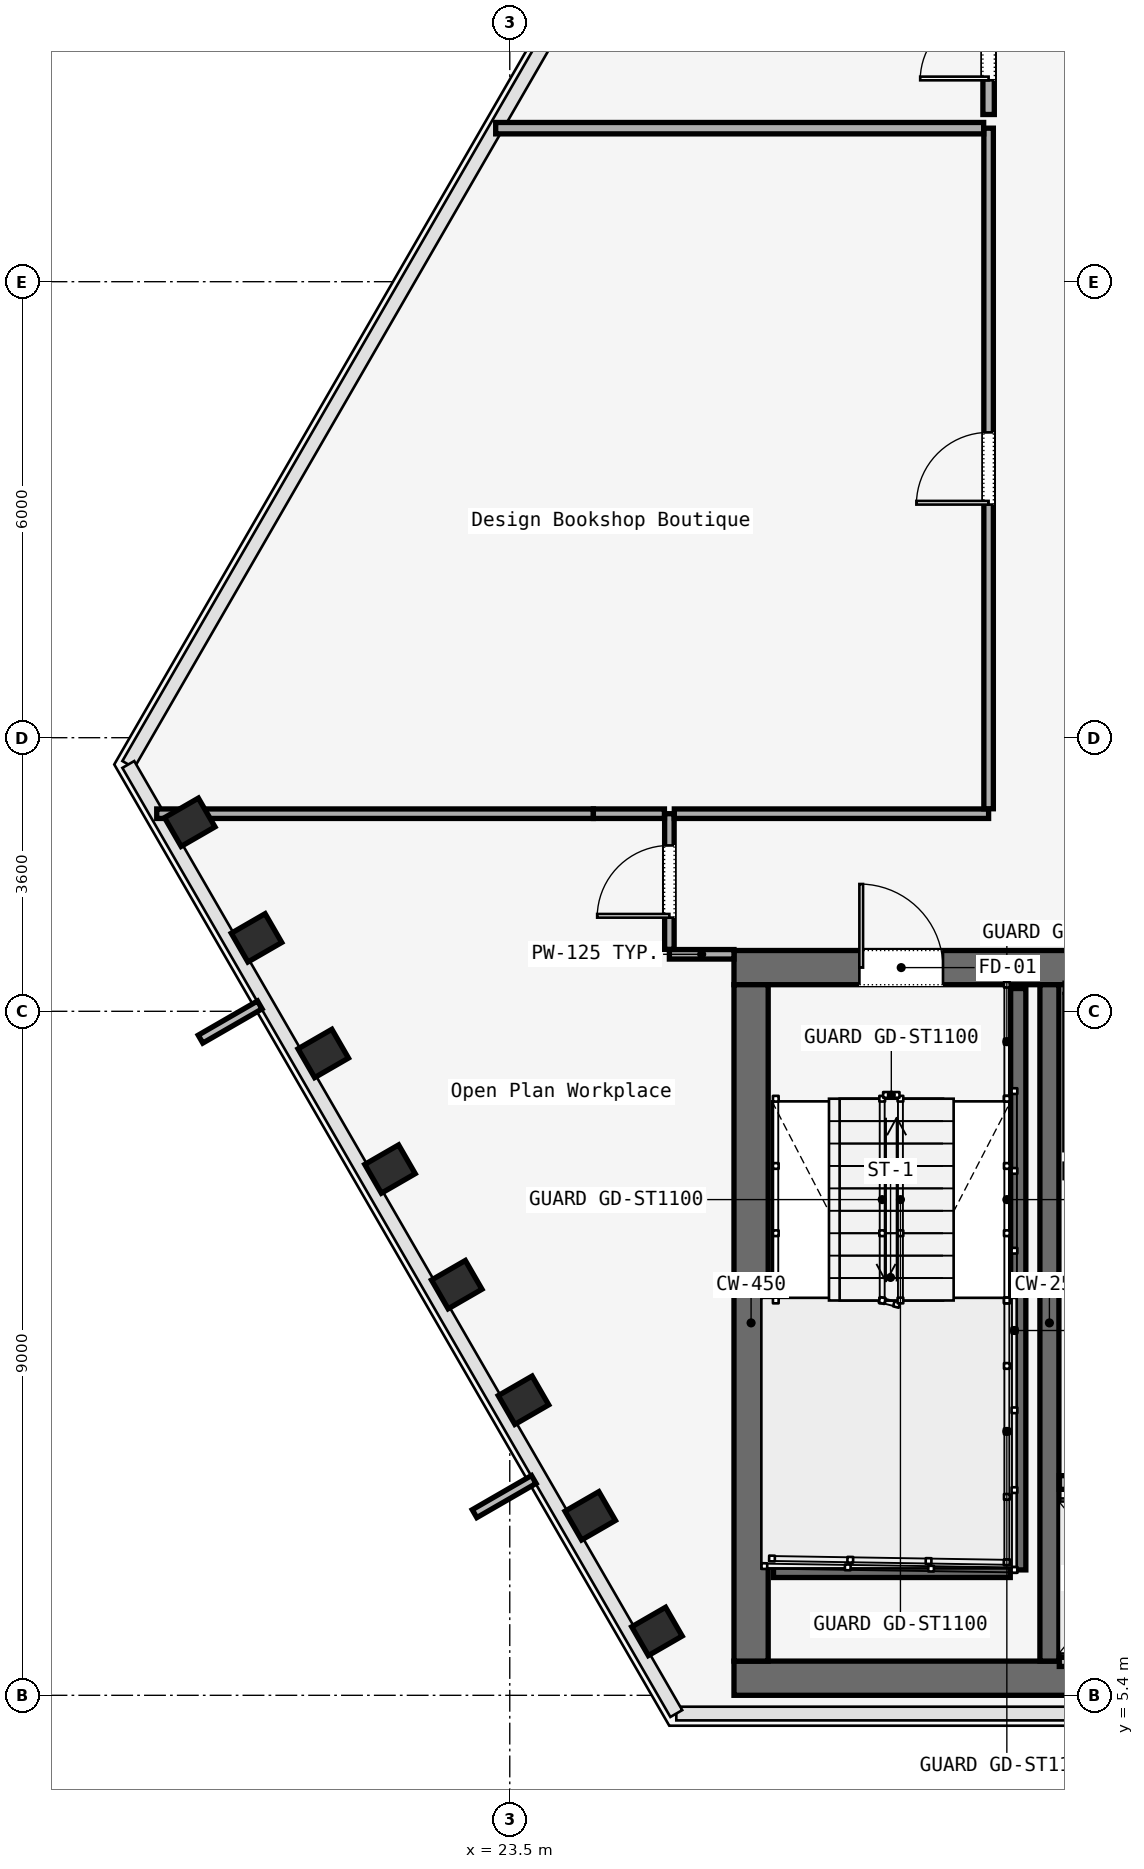
"""IFC4 building model, lengths in metres.
Left out: names, types, materials, properties, quantities, classifications, styles, units other than length and angle.
Written with IfcOpenShell. Run it as: python <this file> out.ifc"""

import sys

from ifc_helpers import new_model, si_unit, direction, frame, frame_2d, origin, origin_2d, place, context, subcontext, project, spatial, rectangle, i_section, extrude, element, fill, save


model = new_model("IFC4")
c1 = context("Model", 3, precision=1e-05, world=origin(), true_north=direction((0.0, 1.0)))
c2 = subcontext(c1, "Body", "Model", "MODEL_VIEW")
j1 = project(units=[si_unit("LENGTHUNIT", "METRE"), si_unit("PLANEANGLEUNIT", "RADIAN")], contexts=[c1])
p1 = place(None, origin())
s1 = spatial("IfcSite", under=j1, at=p1, CompositionType="ELEMENT")
p2 = place(p1, origin())
s2 = spatial("IfcBuilding", under=s1, at=p2, CompositionType="ELEMENT")
p3 = place(p2, frame((0.0, 0.0, 85.4)))
s3 = spatial("IfcBuildingStorey", under=s2, at=p3, CompositionType="ELEMENT", Elevation=85.4)
p4 = place(p3, frame((26.45, 14.975, 0.0), z_axis=(0.0, 0.0, 1.0), x_axis=(1.0, 0.0, 0.0)))
e1 = element("IfcWall", 1, at=p4, inside=s3, PredefinedType="SOLIDWALL", context=c2, shape_type="SweptSolid", body=[
    extrude(rectangle(XDim=31.1, YDim=0.45, at=frame_2d((15.55, 0.0))), origin(), (0.0, 0.0, 1.0), 3.58),
])
p5 = place(p4, frame((1.65, 0.0, 0.0)))
e2 = element("IfcOpeningElement", 2, at=p5, cuts=e1, PredefinedType="OPENING", context=c2, shape_type="SweptSolid", body=[
    extrude(rectangle(XDim=1.1, YDim=2.2, at=frame_2d((0.55, 1.1))), frame((0.0, 0.225, 0.0), z_axis=(0.0, -1.0, 0.0), x_axis=(1.0, 0.0, 0.0)), (0.0, 0.0, 1.0), 0.45),
])
p6 = place(p4, frame((13.65, 0.0, 0.0)))
e3 = element("IfcOpeningElement", 3, at=p6, cuts=e1, PredefinedType="OPENING", context=c2, shape_type="SweptSolid", body=[
    extrude(rectangle(XDim=1.1, YDim=2.2, at=frame_2d((0.55, 1.1))), frame((0.0, 0.225, 0.0), z_axis=(0.0, -1.0, 0.0), x_axis=(1.0, 0.0, 0.0)), (0.0, 0.0, 1.0), 0.45),
])
p7 = place(p4, frame((25.55, 0.0, 0.0)))
e4 = element("IfcOpeningElement", 4, at=p7, cuts=e1, PredefinedType="OPENING", context=c2, shape_type="SweptSolid", body=[
    extrude(rectangle(XDim=1.1, YDim=2.2, at=frame_2d((0.55, 1.1))), frame((0.0, 0.225, 0.0), z_axis=(0.0, -1.0, 0.0), x_axis=(1.0, 0.0, 0.0)), (0.0, 0.0, 1.0), 0.45),
])
p8 = place(p4, frame((10.7, 0.0, 0.0)))
e5 = element("IfcOpeningElement", 5, at=p8, cuts=e1, PredefinedType="OPENING", context=c2, shape_type="SweptSolid", body=[
    extrude(rectangle(XDim=1.4, YDim=2.2, at=frame_2d((0.7, 1.1))), frame((0.0, 0.225, 0.0), z_axis=(0.0, -1.0, 0.0), x_axis=(1.0, 0.0, 0.0)), (0.0, 0.0, 1.0), 0.45),
])
p9 = place(p4, frame((19.35, 0.0, 0.0)))
e6 = element("IfcOpeningElement", 6, at=p9, cuts=e1, PredefinedType="OPENING", context=c2, shape_type="SweptSolid", body=[
    extrude(rectangle(XDim=1.1, YDim=2.2, at=frame_2d((0.55, 1.1))), frame((0.0, 0.225, 0.0), z_axis=(0.0, -1.0, 0.0), x_axis=(1.0, 0.0, 0.0)), (0.0, 0.0, 1.0), 0.45),
])
p10 = place(p4, frame((21.4, 0.0, 0.0)))
e7 = element("IfcOpeningElement", 7, at=p10, cuts=e1, PredefinedType="OPENING", context=c2, shape_type="SweptSolid", body=[
    extrude(rectangle(XDim=0.9, YDim=2.1, at=frame_2d((0.45, 1.05))), frame((0.0, 0.225, 0.0), z_axis=(0.0, -1.0, 0.0), x_axis=(1.0, 0.0, 0.0)), (0.0, 0.0, 1.0), 0.45),
])
p11 = place(p4, frame((23.35, 0.0, 0.0)))
e8 = element("IfcOpeningElement", 8, at=p11, cuts=e1, PredefinedType="OPENING", context=c2, shape_type="SweptSolid", body=[
    extrude(rectangle(XDim=1.3, YDim=2.3, at=frame_2d((0.65, 1.15))), frame((0.0, 0.225, 0.0), z_axis=(0.0, -1.0, 0.0), x_axis=(1.0, 0.0, 0.0)), (0.0, 0.0, 1.0), 0.45),
])
p12 = place(p3, frame((26.45, 5.625, 0.0), z_axis=(0.0, 0.0, 1.0), x_axis=(1.0, 0.0, 0.0)))
e9 = element("IfcWall", 9, at=p12, inside=s3, PredefinedType="SOLIDWALL", context=c2, shape_type="SweptSolid", body=[
    extrude(rectangle(XDim=31.1, YDim=0.45, at=frame_2d((15.55, 0.0))), origin(), (0.0, 0.0, 1.0), 3.58),
])
p13 = place(p3, frame((26.675, 5.85, 0.0), z_axis=(0.0, 0.0, 1.0), x_axis=(0.0, 1.0, 0.0)))
e10 = element("IfcWall", 10, at=p13, inside=s3, PredefinedType="SOLIDWALL", context=c2, shape_type="SweptSolid", body=[
    extrude(rectangle(XDim=8.9, YDim=0.45, at=frame_2d((4.45, 0.0))), origin(), (0.0, 0.0, 1.0), 3.58),
])
p14 = place(p3, frame((30.6, 5.85, 0.0), z_axis=(0.0, 0.0, 1.0), x_axis=(0.0, 1.0, 0.0)))
e11 = element("IfcWall", 11, at=p14, inside=s3, PredefinedType="SOLIDWALL", context=c2, shape_type="SweptSolid", body=[
    extrude(rectangle(XDim=8.9, YDim=0.25, at=frame_2d((4.45, 0.0))), origin(), (0.0, 0.0, 1.0), 3.58),
])
for number, where, z_axis, x_axis in (
    (12, (19.29, 16.887, 0.0), (0.0, 0.0, 1.0), (-0.5, 0.866, 0.0)),
    (13, (20.168, 15.366, 0.0), (0.0, 0.0, 1.0), (-0.5, 0.866, 0.0)),
    (14, (21.046, 13.845, 0.0), (0.0, 0.0, 1.0), (-0.5, 0.866, 0.0)),
    (15, (21.924, 12.324, 0.0), (0.0, 0.0, 1.0), (-0.5, 0.866, 0.0)),
    (16, (22.802, 10.803, 0.0), (0.0, 0.0, 1.0), (-0.5, 0.866, 0.0)),
    (17, (23.68, 9.282, 0.0), (0.0, 0.0, 1.0), (-0.5, 0.866, 0.0)),
    (18, (24.559, 7.761, 0.0), (0.0, 0.0, 1.0), (-0.5, 0.866, 0.0)),
    (19, (25.437, 6.24, 0.0), (0.0, 0.0, 1.0), (-0.5, 0.866, 0.0)),
):
    element("IfcColumn", number, at=place(p3, frame(where, z_axis=z_axis, x_axis=x_axis)), inside=s3, PredefinedType="COLUMN", context=c2, shape_type="SweptSolid", body=[
        extrude(i_section(OverallWidth=0.437, OverallDepth=0.514, WebThickness=0.061, FlangeThickness=0.077, FilletRadius=0.015, at=origin_2d()), origin(), (0.0, 0.0, 1.0), 3.58),
    ])
p15 = place(p3, frame((30.19, 14.7, 0.0), z_axis=(0.0, 0.0, 1.0), x_axis=(0.0, -1.0, 0.0)))
e20 = element("IfcWall", 20, at=p15, inside=s3, PredefinedType="SOLIDWALL", context=c2, shape_type="SweptSolid", body=[
    extrude(rectangle(XDim=7.65, YDim=0.2, at=frame_2d((3.825, 0.0))), origin(), (0.0, 0.0, 1.0), 3.8),
])
p16 = place(p3, frame((26.97, 7.05, 0.0), z_axis=(0.0, 0.0, 1.0), x_axis=(1.0, 0.0, 0.0)))
e21 = element("IfcWall", 21, at=p16, inside=s3, PredefinedType="SOLIDWALL", context=c2, shape_type="SweptSolid", body=[
    extrude(rectangle(XDim=3.115, YDim=0.2, at=frame_2d((1.558, 0.0))), origin(), (0.0, 0.0, 1.0), 3.8),
])
p17 = place(p3, frame((30.73, 8.2, 0.0), z_axis=(0.0, 0.0, 1.0), x_axis=(1.0, 0.0, 0.0)))
e22 = element("IfcWall", 22, at=p17, inside=s3, PredefinedType="SOLIDWALL", context=c2, shape_type="SweptSolid", body=[
    extrude(rectangle(XDim=1.665, YDim=0.18, at=frame_2d((0.833, 0.0))), origin(), (0.0, 0.0, 1.0), 2.95),
])
p18 = place(p17, frame((0.282, 0.0, 0.0)))
e23 = element("IfcOpeningElement", 23, at=p18, cuts=e22, PredefinedType="OPENING", context=c2, shape_type="SweptSolid", body=[
    extrude(rectangle(XDim=1.1, YDim=2.2, at=frame_2d((0.55, 1.1))), frame((0.0, 0.09, 0.0), z_axis=(0.0, -1.0, 0.0), x_axis=(1.0, 0.0, 0.0)), (0.0, 0.0, 1.0), 0.18),
])
p19 = place(p3, frame((30.73, 5.84, 0.0), z_axis=(0.0, 0.0, 1.0), x_axis=(1.0, 0.0, 0.0)))
e24 = element("IfcWall", 24, at=p19, inside=s3, PredefinedType="SOLIDWALL", context=c2, shape_type="SweptSolid", body=[
    extrude(rectangle(XDim=1.665, YDim=0.12, at=frame_2d((0.833, 0.0))), origin(), (0.0, 0.0, 1.0), 2.95),
])
p20 = place(p3, frame((26.45, 15.15, 0.0), z_axis=(0.0, 0.0, 1.0), x_axis=(-1.0, 0.0, 0.0)))
e25 = element("IfcWall", 25, at=p20, inside=s3, PredefinedType="PARTITIONING", context=c2, shape_type="SweptSolid", body=[
    extrude(rectangle(XDim=0.85, YDim=0.125, at=frame_2d((0.425, 0.0))), origin(), (0.0, 0.0, 1.0), 2.95),
])
p21 = place(p3, frame((25.6, 15.215, 0.0), z_axis=(0.0, 0.0, 1.0), x_axis=(0.0, 1.0, 0.0)))
e26 = element("IfcWall", 26, at=p21, inside=s3, PredefinedType="PARTITIONING", context=c2, shape_type="SweptSolid", body=[
    extrude(rectangle(XDim=1.785, YDim=0.125, at=frame_2d((0.893, 0.0))), origin(), (0.0, 0.0, 1.0), 2.95),
])
p22 = place(p21, frame((0.417, 0.0, 0.0)))
e27 = element("IfcOpeningElement", 27, at=p22, cuts=e26, PredefinedType="OPENING", context=c2, shape_type="SweptSolid", body=[
    extrude(rectangle(XDim=0.95, YDim=2.2, at=frame_2d((0.475, 1.1))), frame((0.0, 0.062, 0.0), z_axis=(0.0, -1.0, 0.0), x_axis=(1.0, 0.0, 0.0)), (0.0, 0.0, 1.0), 0.125),
])
p23 = place(p3, frame((25.665, 17.0, 0.0), z_axis=(0.0, 0.0, 1.0), x_axis=(1.0, 0.0, 0.0)))
e28 = element("IfcWall", 28, at=p23, inside=s3, PredefinedType="PARTITIONING", context=c2, shape_type="SweptSolid", body=[
    extrude(rectangle(XDim=4.135, YDim=0.125, at=frame_2d((2.067, 0.0))), origin(), (0.0, 0.0, 1.0), 2.95),
])
p24 = place(p3, frame((29.8, 17.065, 0.0), z_axis=(0.0, 0.0, 1.0), x_axis=(0.0, 1.0, 0.0)))
e29 = element("IfcWall", 29, at=p24, inside=s3, PredefinedType="PARTITIONING", context=c2, shape_type="SweptSolid", body=[
    extrude(rectangle(XDim=8.955, YDim=0.125, at=frame_2d((4.478, 0.0))), origin(), (0.0, 0.0, 1.0), 2.95),
])
p25 = place(p24, frame((4.002, 0.0, 0.0)))
e30 = element("IfcOpeningElement", 30, at=p25, cuts=e29, PredefinedType="OPENING", context=c2, shape_type="SweptSolid", body=[
    extrude(rectangle(XDim=0.95, YDim=2.2, at=frame_2d((0.475, 1.1))), frame((0.0, 0.062, 0.0), z_axis=(0.0, -1.0, 0.0), x_axis=(1.0, 0.0, 0.0)), (0.0, 0.0, 1.0), 0.125),
])
p26 = place(p3, frame((29.8, 26.2, 0.0), z_axis=(0.0, 0.0, 1.0), x_axis=(0.0, 1.0, 0.0)))
e31 = element("IfcWall", 31, at=p26, inside=s3, PredefinedType="PARTITIONING", context=c2, shape_type="SweptSolid", body=[
    extrude(rectangle(XDim=1.8, YDim=0.15, at=frame_2d((0.9, 0.0))), origin(), (0.0, 0.0, 1.0), 2.95),
])
p27 = place(p26, frame((0.45, 0.0, 0.0)))
e32 = element("IfcOpeningElement", 32, at=p27, cuts=e31, PredefinedType="OPENING", context=c2, shape_type="SweptSolid", body=[
    extrude(rectangle(XDim=0.9, YDim=2.15, at=frame_2d((0.45, 1.075))), frame((0.0, 0.075, 0.0), z_axis=(0.0, -1.0, 0.0), x_axis=(1.0, 0.0, 0.0)), (0.0, 0.0, 1.0), 0.15),
])
p28 = place(p3, frame((18.855, 17.0, 0.0), z_axis=(0.0, 0.0, 1.0), x_axis=(1.0, 0.0, 0.0)))
e33 = element("IfcWall", 33, at=p28, inside=s3, PredefinedType="PARTITIONING", context=c2, shape_type="SweptSolid", body=[
    extrude(rectangle(XDim=5.745, YDim=0.125, at=frame_2d((2.873, 0.0))), origin(), (0.0, 0.0, 1.0), 2.95),
])
p29 = place(p3, frame((24.6, 17.0, 0.0), z_axis=(0.0, 0.0, 1.0), x_axis=(1.0, 0.0, 0.0)))
e34 = element("IfcWall", 34, at=p29, inside=s3, PredefinedType="PARTITIONING", context=c2, shape_type="SweptSolid", body=[
    extrude(rectangle(XDim=0.935, YDim=0.125, at=frame_2d((0.467, 0.0))), origin(), (0.0, 0.0, 1.0), 2.95),
])
p30 = place(p3, frame((23.315, 26.02, 0.0), z_axis=(0.0, 0.0, 1.0), x_axis=(1.0, 0.0, 0.0)))
e35 = element("IfcWall", 35, at=p30, inside=s3, PredefinedType="PARTITIONING", context=c2, shape_type="SweptSolid", body=[
    extrude(rectangle(XDim=6.42, YDim=0.15, at=frame_2d((3.21, 0.0))), origin(), (0.0, 0.0, 1.0), 2.95),
])
p31 = place(p5, origin())
e36 = element("IfcDoor", 36, at=p31, inside=s3, OperationType="SINGLE_SWING_RIGHT", PredefinedType="DOOR", context=c2, shape_type="SweptSolid", body=[
    extrude(rectangle(XDim=1.1, YDim=2.2, at=frame_2d((0.55, 1.1))), frame((0.0, 0.025, 0.0), z_axis=(0.0, -1.0, 0.0), x_axis=(1.0, 0.0, 0.0)), (0.0, 0.0, 1.0), 0.05),
])
fill(e2, e36)
p32 = place(p22, origin())
e37 = element("IfcDoor", 37, at=p32, inside=s3, OperationType="SINGLE_SWING_RIGHT", PredefinedType="DOOR", context=c2, shape_type="SweptSolid", body=[
    extrude(rectangle(XDim=0.95, YDim=2.2, at=frame_2d((0.475, 1.1))), frame((0.0, 0.025, 0.0), z_axis=(0.0, -1.0, 0.0), x_axis=(1.0, 0.0, 0.0)), (0.0, 0.0, 1.0), 0.05),
])
fill(e27, e37)
p33 = place(p25, origin())
e38 = element("IfcDoor", 38, at=p33, inside=s3, OperationType="SINGLE_SWING_RIGHT", PredefinedType="DOOR", context=c2, shape_type="SweptSolid", body=[
    extrude(rectangle(XDim=0.95, YDim=2.2, at=frame_2d((0.475, 1.1))), frame((0.0, 0.025, 0.0), z_axis=(0.0, -1.0, 0.0), x_axis=(1.0, 0.0, 0.0)), (0.0, 0.0, 1.0), 0.05),
])
fill(e30, e38)
p34 = place(p27, origin())
e39 = element("IfcDoor", 39, at=p34, inside=s3, OperationType="SINGLE_SWING_LEFT", PredefinedType="DOOR", context=c2, shape_type="SweptSolid", body=[
    extrude(rectangle(XDim=0.9, YDim=2.15, at=frame_2d((0.45, 1.075))), frame((0.0, 0.025, 0.0), z_axis=(0.0, -1.0, 0.0), x_axis=(1.0, 0.0, 0.0)), (0.0, 0.0, 1.0), 0.05),
])
fill(e32, e39)
save(model, sys.argv[1])
